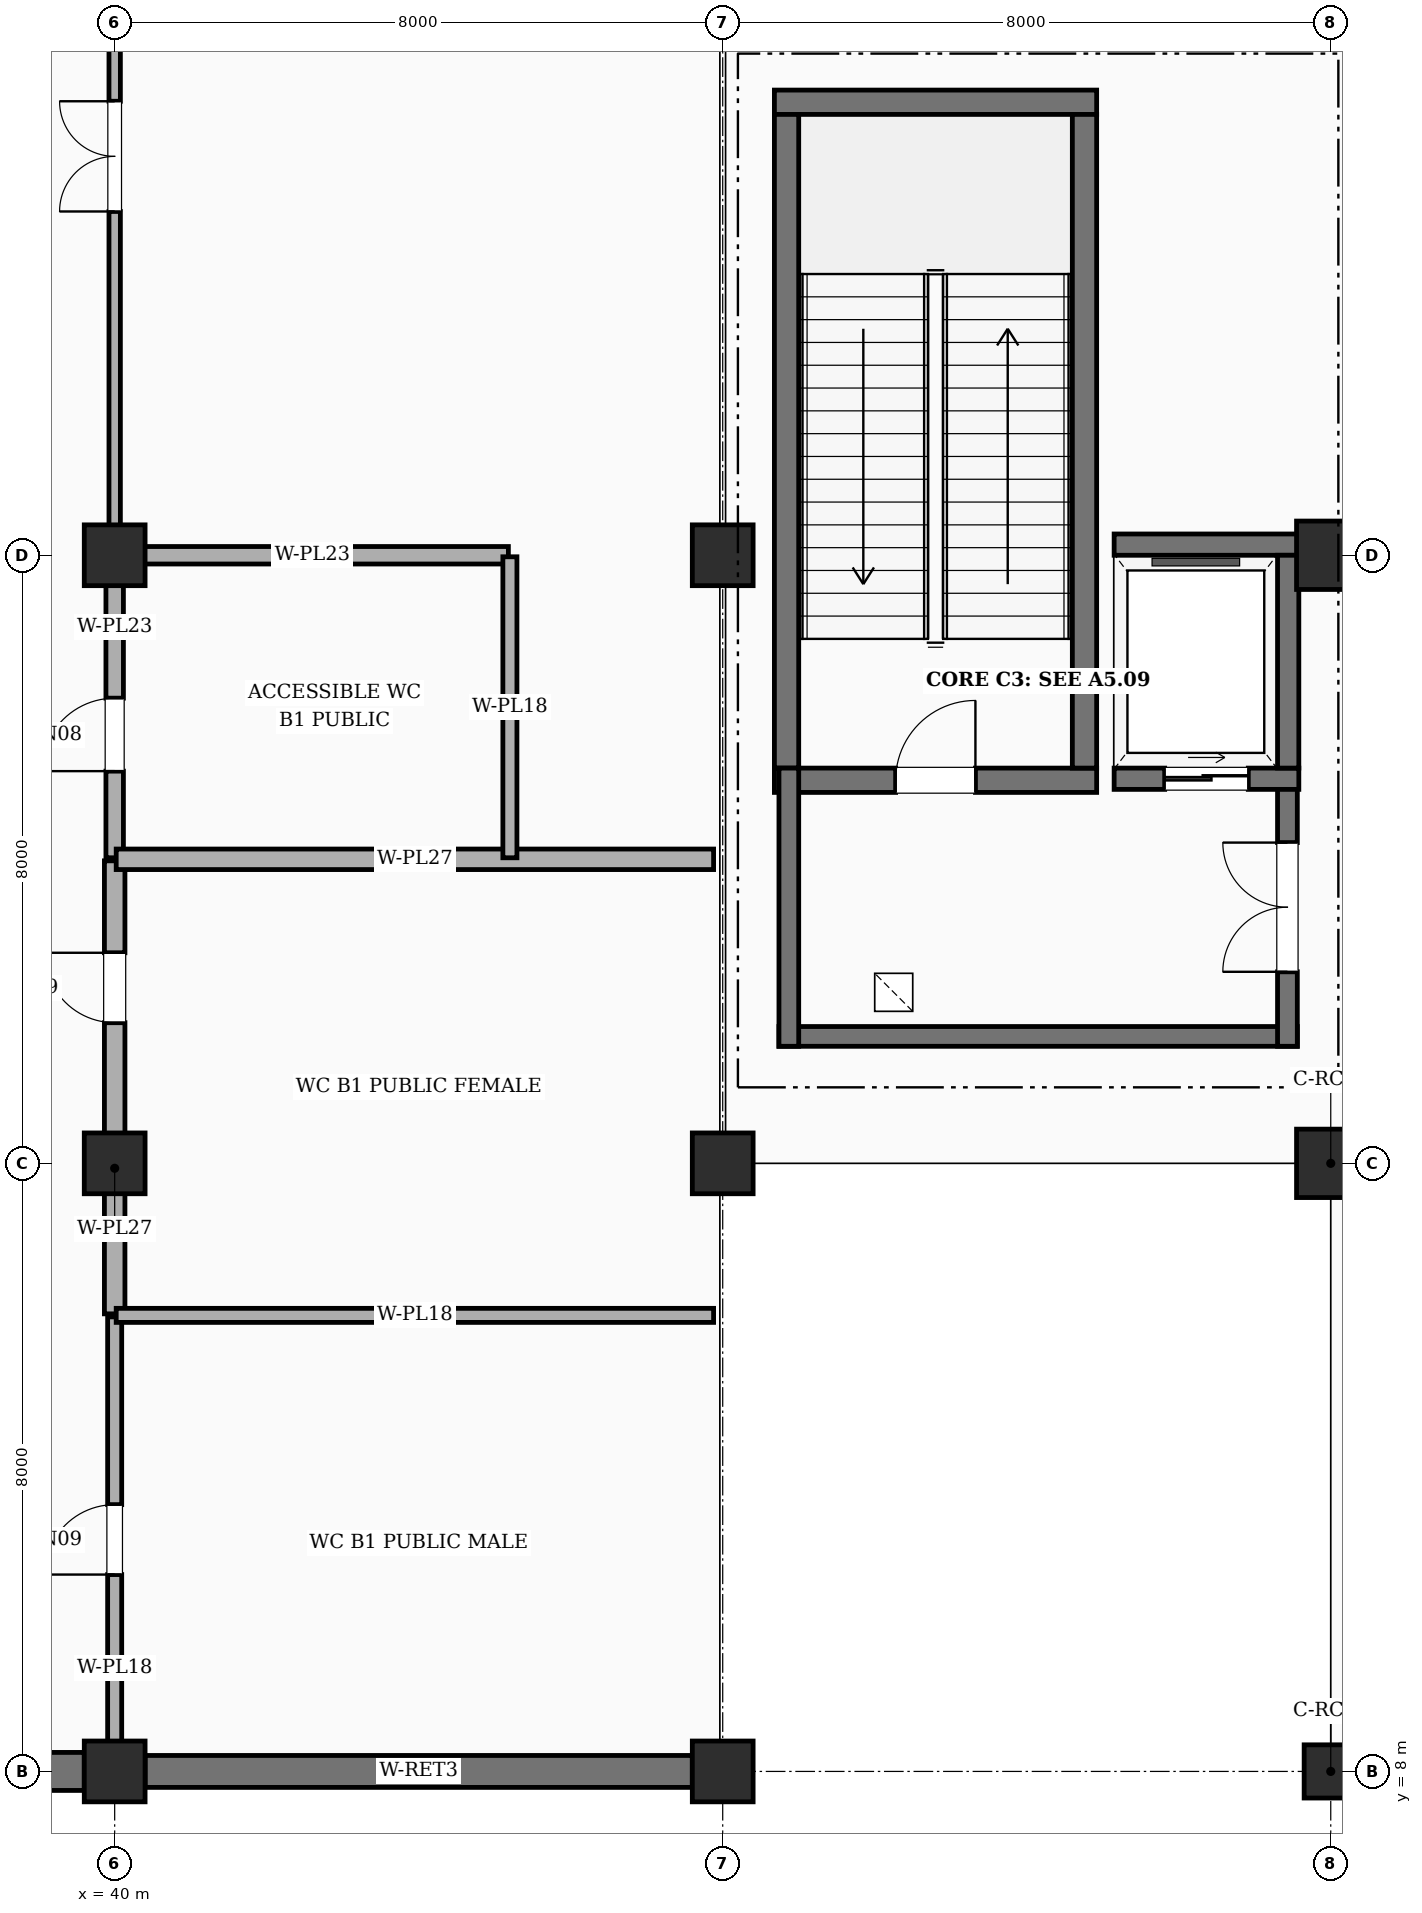
"""IFC4 building model, lengths in metres.
Left out: names, types, materials, properties, quantities, classifications, styles, units other than length and angle.
Written with IfcOpenShell. Run it as: python <this file> out.ifc"""

import sys

from ifc_helpers import new_model, si_unit, direction, frame, frame_2d, origin, origin_2d, place, context, subcontext, project, spatial, rectangle, extrude, element, fill, save


model = new_model("IFC4")
c1 = context("Model", 3, precision=1e-05, world=origin(), true_north=direction((0.0, 1.0)))
c2 = subcontext(c1, "Body", "Model", "MODEL_VIEW")
j1 = project(units=[si_unit("LENGTHUNIT", "METRE"), si_unit("PLANEANGLEUNIT", "RADIAN")], contexts=[c1])
p1 = place(None, origin())
s1 = spatial("IfcSite", under=j1, at=p1, CompositionType="ELEMENT")
p2 = place(p1, origin())
s2 = spatial("IfcBuilding", under=s1, at=p2, CompositionType="ELEMENT")
p3 = place(p2, frame((0.0, 0.0, -5.4)))
s3 = spatial("IfcBuildingStorey", under=s2, at=p3, CompositionType="ELEMENT", Elevation=-5.4)
for number, where, z_axis, x_axis in (
    (1, (40.0, 8.0, -0.4), (0.0, 0.0, 1.0), (1.0, 0.0, 0.0)),
    (2, (40.0, 16.0, -0.4), (0.0, 0.0, 1.0), (1.0, 0.0, 0.0)),
    (3, (40.0, 24.0, -0.4), (0.0, 0.0, 1.0), (1.0, 0.0, 0.0)),
    (4, (48.0, 8.0, -0.4), (0.0, 0.0, 1.0), (1.0, 0.0, 0.0)),
    (5, (48.0, 16.0, -0.4), (0.0, 0.0, 1.0), (1.0, 0.0, 0.0)),
    (6, (48.0, 24.0, -0.4), (0.0, 0.0, 1.0), (1.0, 0.0, 0.0)),
):
    element("IfcColumn", number, at=place(p3, frame(where, z_axis=z_axis, x_axis=x_axis)), inside=s3, PredefinedType="COLUMN", context=c2, shape_type="SweptSolid", body=[
        extrude(rectangle(XDim=0.8, YDim=0.8, at=origin_2d()), origin(), (0.0, 0.0, 1.0), 5.8),
    ])
p4 = place(p3, frame((56.0, 8.0, -0.4), z_axis=(0.0, 0.0, 1.0), x_axis=(1.0, 0.0, 0.0)))
e7 = element("IfcColumn", 7, at=p4, inside=s3, PredefinedType="COLUMN", context=c2, shape_type="SweptSolid", body=[
    extrude(rectangle(XDim=0.7, YDim=0.7, at=origin_2d()), origin(), (0.0, 0.0, 1.0), 5.8),
])
for number, where, z_axis, x_axis in (
    (8, (56.0, 16.0, -0.4), (0.0, 0.0, 1.0), (1.0, 0.0, 0.0)),
    (9, (56.0, 24.0, -0.4), (0.0, 0.0, 1.0), (1.0, 0.0, 0.0)),
):
    element("IfcColumn", number, at=place(p3, frame(where, z_axis=z_axis, x_axis=x_axis)), inside=s3, PredefinedType="COLUMN", context=c2, shape_type="SweptSolid", body=[
        extrude(rectangle(XDim=0.9, YDim=0.9, at=origin_2d()), origin(), (0.0, 0.0, 1.0), 5.8),
    ])
p5 = place(p3, frame((32.4, 8.0, 0.0), z_axis=(0.0, 0.0, 1.0), x_axis=(1.0, 0.0, 0.0)))
e10 = element("IfcWall", 10, at=p5, inside=s3, PredefinedType="USERDEFINED", context=c2, shape_type="SweptSolid", body=[
    extrude(rectangle(XDim=7.2, YDim=0.5, at=frame_2d((3.6, 0.0))), origin(), (0.0, 0.0, 1.0), 4.4),
])
p6 = place(p3, frame((40.4, 8.0, 0.0), z_axis=(0.0, 0.0, 1.0), x_axis=(1.0, 0.0, 0.0)))
e11 = element("IfcWall", 11, at=p6, inside=s3, PredefinedType="USERDEFINED", context=c2, shape_type="SweptSolid", body=[
    extrude(rectangle(XDim=7.2, YDim=0.42, at=frame_2d((3.6, 0.0))), origin(), (0.0, 0.0, 1.0), 4.4),
])
p7 = place(p3, frame((48.68, 21.04, 0.0), z_axis=(0.0, 0.0, 1.0), x_axis=(1.0, 0.0, 0.0)))
e12 = element("IfcWall", 12, at=p7, inside=s3, PredefinedType="SHEAR", context=c2, shape_type="SweptSolid", body=[
    extrude(rectangle(XDim=4.24, YDim=0.32, at=frame_2d((2.12, 0.0))), origin(), (0.0, 0.0, 1.0), 5.4),
])
p8 = place(p7, frame((1.595, 0.0, 0.0)))
e13 = element("IfcOpeningElement", 13, at=p8, cuts=e12, PredefinedType="OPENING", context=c2, shape_type="SweptSolid", body=[
    extrude(rectangle(XDim=1.05, YDim=2.15, at=frame_2d((0.525, 1.075))), frame((0.0, 0.17, 0.0), z_axis=(0.0, -1.0, 0.0), x_axis=(1.0, 0.0, 0.0)), (0.0, 0.0, 1.0), 0.34),
])
p9 = place(p3, frame((48.68, 29.96, 0.0), z_axis=(0.0, 0.0, 1.0), x_axis=(1.0, 0.0, 0.0)))
e14 = element("IfcWall", 14, at=p9, inside=s3, PredefinedType="SHEAR", context=c2, shape_type="SweptSolid", body=[
    extrude(rectangle(XDim=4.24, YDim=0.32, at=frame_2d((2.12, 0.0))), origin(), (0.0, 0.0, 1.0), 5.4),
])
for number, where, z_axis, x_axis in (
    (15, (48.84, 21.2, 0.0), (0.0, 0.0, 1.0), (0.0, 1.0, 0.0)),
    (16, (52.76, 21.2, 0.0), (0.0, 0.0, 1.0), (0.0, 1.0, 0.0)),
):
    element("IfcWall", number, at=place(p3, frame(where, z_axis=z_axis, x_axis=x_axis)), inside=s3, PredefinedType="SHEAR", context=c2, shape_type="SweptSolid", body=[
        extrude(rectangle(XDim=8.6, YDim=0.32, at=frame_2d((4.3, 0.0))), origin(), (0.0, 0.0, 1.0), 5.4),
    ])
p10 = place(p3, frame((55.56, 17.67, 0.0), z_axis=(0.0, 0.0, 1.0), x_axis=(-1.0, 0.0, 0.0)))
e17 = element("IfcWall", 17, at=p10, inside=s3, PredefinedType="SHEAR", context=c2, shape_type="SweptSolid", body=[
    extrude(rectangle(XDim=6.82, YDim=0.26, at=frame_2d((3.41, 0.0))), origin(), (0.0, 0.0, 1.0), 5.4),
])
p11 = place(p3, frame((48.87, 17.54, 0.0), z_axis=(0.0, 0.0, 1.0), x_axis=(0.0, 1.0, 0.0)))
e18 = element("IfcWall", 18, at=p11, inside=s3, PredefinedType="SHEAR", context=c2, shape_type="SweptSolid", body=[
    extrude(rectangle(XDim=3.66, YDim=0.26, at=frame_2d((1.83, 0.0))), origin(), (0.0, 0.0, 1.0), 5.4),
])
p12 = place(p3, frame((55.43, 17.54, 0.0), z_axis=(0.0, 0.0, 1.0), x_axis=(0.0, 1.0, 0.0)))
e19 = element("IfcWall", 19, at=p12, inside=s3, PredefinedType="SHEAR", context=c2, shape_type="SweptSolid", body=[
    extrude(rectangle(XDim=3.66, YDim=0.26, at=frame_2d((1.83, 0.0))), origin(), (0.0, 0.0, 1.0), 5.4),
])
p13 = place(p12, frame((0.98, 0.0, 0.0)))
e20 = element("IfcOpeningElement", 20, at=p13, cuts=e19, PredefinedType="OPENING", context=c2, shape_type="SweptSolid", body=[
    extrude(rectangle(XDim=1.7, YDim=2.2, at=frame_2d((0.85, 1.1))), frame((0.0, 0.14, 0.0), z_axis=(0.0, -1.0, 0.0), x_axis=(1.0, 0.0, 0.0)), (0.0, 0.0, 1.0), 0.28),
])
p14 = place(p3, frame((53.15, 21.06, 0.0), z_axis=(0.0, 0.0, 1.0), x_axis=(1.0, 0.0, 0.0)))
e21 = element("IfcWall", 21, at=p14, inside=s3, PredefinedType="SHEAR", context=c2, shape_type="SweptSolid", body=[
    extrude(rectangle(XDim=2.43, YDim=0.28, at=frame_2d((1.215, 0.0))), origin(), (0.0, 0.0, 1.0), 5.4),
])
p15 = place(p14, frame((0.665, 0.0, 0.0)))
e22 = element("IfcOpeningElement", 22, at=p15, cuts=e21, PredefinedType="OPENING", context=c2, shape_type="SweptSolid", body=[
    extrude(rectangle(XDim=1.1, YDim=2.15, at=frame_2d((0.55, 1.075))), frame((0.0, 0.15, 0.0), z_axis=(0.0, -1.0, 0.0), x_axis=(1.0, 0.0, 0.0)), (0.0, 0.0, 1.0), 0.3),
])
p16 = place(p3, frame((53.15, 24.14, 0.0), z_axis=(0.0, 0.0, 1.0), x_axis=(1.0, 0.0, 0.0)))
e23 = element("IfcWall", 23, at=p16, inside=s3, PredefinedType="SHEAR", context=c2, shape_type="SweptSolid", body=[
    extrude(rectangle(XDim=2.43, YDim=0.28, at=frame_2d((1.215, 0.0))), origin(), (0.0, 0.0, 1.0), 5.4),
])
p17 = place(p3, frame((55.44, 21.2, 0.0), z_axis=(0.0, 0.0, 1.0), x_axis=(0.0, 1.0, 0.0)))
e24 = element("IfcWall", 24, at=p17, inside=s3, PredefinedType="SHEAR", context=c2, shape_type="SweptSolid", body=[
    extrude(rectangle(XDim=2.8, YDim=0.28, at=frame_2d((1.4, 0.0))), origin(), (0.0, 0.0, 1.0), 5.4),
])
p18 = place(p3, frame((40.0, 24.02, 0.0), z_axis=(0.0, 0.0, 1.0), x_axis=(0.0, 1.0, 0.0)))
e25 = element("IfcWall", 25, at=p18, inside=s3, PredefinedType="PARTITIONING", context=c2, shape_type="SweptSolid", body=[
    extrude(rectangle(XDim=16.46, YDim=0.15, at=frame_2d((8.23, 0.0))), origin(), (0.0, 0.0, 1.0), 4.15),
])
p19 = place(p18, frame((4.503, 0.0, 0.0)))
e26 = element("IfcOpeningElement", 26, at=p19, cuts=e25, PredefinedType="OPENING", context=c2, shape_type="SweptSolid", body=[
    extrude(rectangle(XDim=1.45, YDim=2.2, at=frame_2d((0.725, 1.1))), frame((0.0, 0.085, 0.0), z_axis=(0.0, -1.0, 0.0), x_axis=(1.0, 0.0, 0.0)), (0.0, 0.0, 1.0), 0.17),
])
p20 = place(p3, frame((40.0, 8.12, 0.0), z_axis=(0.0, 0.0, 1.0), x_axis=(0.0, 1.0, 0.0)))
e27 = element("IfcWall", 27, at=p20, inside=s3, PredefinedType="PLUMBINGWALL", context=c2, shape_type="SweptSolid", body=[
    extrude(rectangle(XDim=5.86, YDim=0.185, at=frame_2d((2.93, 0.0))), origin(), (0.0, 0.0, 1.0), 4.15),
])
p21 = place(p20, frame((2.47, 0.0, 0.0)))
e28 = element("IfcOpeningElement", 28, at=p21, cuts=e27, PredefinedType="OPENING", context=c2, shape_type="SweptSolid", body=[
    extrude(rectangle(XDim=0.92, YDim=2.1, at=frame_2d((0.46, 1.05))), frame((0.0, 0.103, 0.0), z_axis=(0.0, -1.0, 0.0), x_axis=(1.0, 0.0, 0.0)), (0.0, 0.0, 1.0), 0.205),
])
p22 = place(p3, frame((40.0, 14.02, 0.0), z_axis=(0.0, 0.0, 1.0), x_axis=(0.0, 1.0, 0.0)))
e29 = element("IfcWall", 29, at=p22, inside=s3, PredefinedType="PLUMBINGWALL", context=c2, shape_type="SweptSolid", body=[
    extrude(rectangle(XDim=5.96, YDim=0.27, at=frame_2d((2.98, 0.0))), origin(), (0.0, 0.0, 1.0), 4.15),
])
p23 = place(p22, frame((3.83, 0.0, 0.0)))
e30 = element("IfcOpeningElement", 30, at=p23, cuts=e29, PredefinedType="OPENING", context=c2, shape_type="SweptSolid", body=[
    extrude(rectangle(XDim=0.92, YDim=2.1, at=frame_2d((0.46, 1.05))), frame((0.0, 0.145, 0.0), z_axis=(0.0, -1.0, 0.0), x_axis=(1.0, 0.0, 0.0)), (0.0, 0.0, 1.0), 0.29),
])
p24 = place(p3, frame((40.0, 20.02, 0.0), z_axis=(0.0, 0.0, 1.0), x_axis=(0.0, 1.0, 0.0)))
e31 = element("IfcWall", 31, at=p24, inside=s3, PredefinedType="PLUMBINGWALL", context=c2, shape_type="SweptSolid", body=[
    extrude(rectangle(XDim=3.96, YDim=0.23, at=frame_2d((1.98, 0.0))), origin(), (0.0, 0.0, 1.0), 4.15),
])
p25 = place(p24, frame((1.14, 0.0, 0.0)))
e32 = element("IfcOpeningElement", 32, at=p25, cuts=e31, PredefinedType="OPENING", context=c2, shape_type="SweptSolid", body=[
    extrude(rectangle(XDim=0.96, YDim=2.1, at=frame_2d((0.48, 1.05))), frame((0.0, 0.125, 0.0), z_axis=(0.0, -1.0, 0.0), x_axis=(1.0, 0.0, 0.0)), (0.0, 0.0, 1.0), 0.25),
])
p26 = place(p3, frame((40.02, 14.0, 0.0), z_axis=(0.0, 0.0, 1.0), x_axis=(1.0, 0.0, 0.0)))
e33 = element("IfcWall", 33, at=p26, inside=s3, PredefinedType="PLUMBINGWALL", context=c2, shape_type="SweptSolid", body=[
    extrude(rectangle(XDim=7.86, YDim=0.185, at=frame_2d((3.93, 0.0))), origin(), (0.0, 0.0, 1.0), 4.15),
])
p27 = place(p3, frame((40.02, 20.0, 0.0), z_axis=(0.0, 0.0, 1.0), x_axis=(1.0, 0.0, 0.0)))
e34 = element("IfcWall", 34, at=p27, inside=s3, PredefinedType="PLUMBINGWALL", context=c2, shape_type="SweptSolid", body=[
    extrude(rectangle(XDim=7.86, YDim=0.27, at=frame_2d((3.93, 0.0))), origin(), (0.0, 0.0, 1.0), 4.15),
])
p28 = place(p3, frame((40.02, 24.0, 0.0), z_axis=(0.0, 0.0, 1.0), x_axis=(1.0, 0.0, 0.0)))
e35 = element("IfcWall", 35, at=p28, inside=s3, PredefinedType="PLUMBINGWALL", context=c2, shape_type="SweptSolid", body=[
    extrude(rectangle(XDim=5.16, YDim=0.23, at=frame_2d((2.58, 0.0))), origin(), (0.0, 0.0, 1.0), 4.15),
])
p29 = place(p3, frame((45.2, 20.02, 0.0), z_axis=(0.0, 0.0, 1.0), x_axis=(0.0, 1.0, 0.0)))
e36 = element("IfcWall", 36, at=p29, inside=s3, PredefinedType="PLUMBINGWALL", context=c2, shape_type="SweptSolid", body=[
    extrude(rectangle(XDim=3.96, YDim=0.185, at=frame_2d((1.98, 0.0))), origin(), (0.0, 0.0, 1.0), 4.15),
])
p30 = place(p8, origin())
e37 = element("IfcDoor", 37, at=p30, inside=s3, OperationType="SINGLE_SWING_RIGHT", PredefinedType="DOOR", context=c2, shape_type="SweptSolid", body=[
    extrude(rectangle(XDim=1.05, YDim=2.15, at=frame_2d((0.525, 1.075))), frame((0.0, 0.025, 0.0), z_axis=(0.0, -1.0, 0.0), x_axis=(1.0, 0.0, 0.0)), (0.0, 0.0, 1.0), 0.05),
])
fill(e13, e37)
p31 = place(p13, origin())
e38 = element("IfcDoor", 38, at=p31, inside=s3, OperationType="DOUBLE_DOOR_SINGLE_SWING", PredefinedType="DOOR", context=c2, shape_type="SweptSolid", body=[
    extrude(rectangle(XDim=1.7, YDim=2.2, at=frame_2d((0.85, 1.1))), frame((0.0, 0.025, 0.0), z_axis=(0.0, -1.0, 0.0), x_axis=(1.0, 0.0, 0.0)), (0.0, 0.0, 1.0), 0.05),
])
fill(e20, e38)
p32 = place(p15, origin())
e39 = element("IfcDoor", 39, at=p32, inside=s3, OperationType="SLIDING_TO_LEFT", PredefinedType="DOOR", context=c2, shape_type="SweptSolid", body=[
    extrude(rectangle(XDim=1.1, YDim=2.15, at=frame_2d((0.55, 1.075))), frame((0.0, 0.025, 0.0), z_axis=(0.0, -1.0, 0.0), x_axis=(1.0, 0.0, 0.0)), (0.0, 0.0, 1.0), 0.05),
])
fill(e22, e39)
p33 = place(p19, origin())
e40 = element("IfcDoor", 40, at=p33, inside=s3, OperationType="DOUBLE_DOOR_SINGLE_SWING", PredefinedType="DOOR", context=c2, shape_type="SweptSolid", body=[
    extrude(rectangle(XDim=1.45, YDim=2.2, at=frame_2d((0.725, 1.1))), frame((0.0, 0.025, 0.0), z_axis=(0.0, -1.0, 0.0), x_axis=(1.0, 0.0, 0.0)), (0.0, 0.0, 1.0), 0.05),
])
fill(e26, e40)
p34 = place(p21, origin())
e41 = element("IfcDoor", 41, at=p34, inside=s3, OperationType="SINGLE_SWING_LEFT", PredefinedType="DOOR", context=c2, shape_type="SweptSolid", body=[
    extrude(rectangle(XDim=0.92, YDim=2.1, at=frame_2d((0.46, 1.05))), frame((0.0, 0.025, 0.0), z_axis=(0.0, -1.0, 0.0), x_axis=(1.0, 0.0, 0.0)), (0.0, 0.0, 1.0), 0.05),
])
fill(e28, e41)
p35 = place(p23, origin())
e42 = element("IfcDoor", 42, at=p35, inside=s3, OperationType="SINGLE_SWING_RIGHT", PredefinedType="DOOR", context=c2, shape_type="SweptSolid", body=[
    extrude(rectangle(XDim=0.92, YDim=2.1, at=frame_2d((0.46, 1.05))), frame((0.0, 0.025, 0.0), z_axis=(0.0, -1.0, 0.0), x_axis=(1.0, 0.0, 0.0)), (0.0, 0.0, 1.0), 0.05),
])
fill(e30, e42)
p36 = place(p25, origin())
e43 = element("IfcDoor", 43, at=p36, inside=s3, OperationType="SINGLE_SWING_LEFT", PredefinedType="DOOR", context=c2, shape_type="SweptSolid", body=[
    extrude(rectangle(XDim=0.96, YDim=2.1, at=frame_2d((0.48, 1.05))), frame((0.0, 0.025, 0.0), z_axis=(0.0, -1.0, 0.0), x_axis=(1.0, 0.0, 0.0)), (0.0, 0.0, 1.0), 0.05),
])
fill(e32, e43)
save(model, sys.argv[1])
